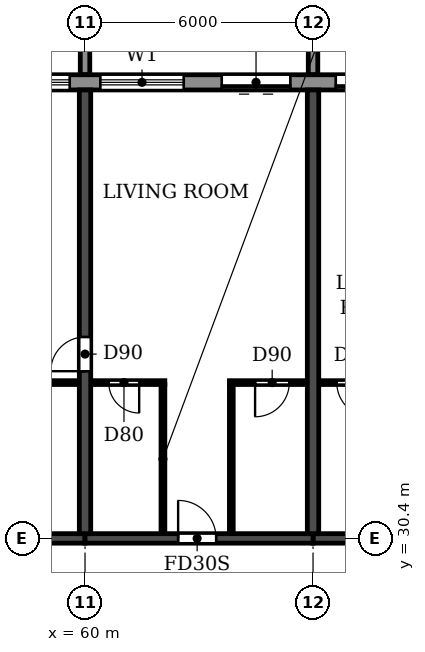
"""IFC4 building model, lengths in metres.
Left out: names, types, materials, properties, quantities, classifications, styles, units other than length and angle.
Written with IfcOpenShell. Run it as: python <this file> out.ifc"""

import sys

from ifc_helpers import new_model, si_unit, direction, frame, frame_2d, origin, place, context, subcontext, project, spatial, polyline, rectangle, outline, extrude, source, transform, mapped, element, fill, save


model = new_model("IFC4")
c1 = context("Model", 3, precision=1e-05, world=origin(), true_north=direction((0.0, 1.0)))
c2 = subcontext(c1, "Body", "Model", "MODEL_VIEW")
j1 = project(units=[si_unit("LENGTHUNIT", "METRE"), si_unit("PLANEANGLEUNIT", "RADIAN")], contexts=[c1])
p1 = place(None, origin())
s1 = spatial("IfcSite", under=j1, at=p1, CompositionType="ELEMENT")
p2 = place(p1, origin())
s2 = spatial("IfcBuilding", under=s1, at=p2, CompositionType="ELEMENT")
p3 = place(p2, frame((0.0, 0.0, 125.7)))
s3 = spatial("IfcBuildingStorey", under=s2, at=p3, CompositionType="ELEMENT", Elevation=125.7)
p4 = place(p3, frame((60.0, 30.525, 0.0), z_axis=(0.0, 0.0, 1.0), x_axis=(0.0, 1.0, 0.0)))
e1 = element("IfcWall", 1, at=p4, inside=s3, PredefinedType="SHEAR", context=c2, shape_type="SweptSolid", body=[
    extrude(rectangle(XDim=11.675, YDim=0.3, at=frame_2d((5.837, 0.0))), origin(), (0.0, 0.0, 1.0), 3.07),
])
p5 = place(p4, frame((4.275, 0.0, 0.0)))
e2 = element("IfcOpeningElement", 2, at=p5, cuts=e1, PredefinedType="OPENING", context=c2, shape_type="SweptSolid", body=[
    extrude(rectangle(XDim=0.9, YDim=2.1, at=frame_2d((0.45, 1.05))), frame((0.0, 0.16, 0.0), z_axis=(0.0, -1.0, 0.0), x_axis=(1.0, 0.0, 0.0)), (0.0, 0.0, 1.0), 0.32),
])
p6 = place(p3, frame((66.0, 30.525, 0.0), z_axis=(0.0, 0.0, 1.0), x_axis=(0.0, 1.0, 0.0)))
e3 = element("IfcWall", 3, at=p6, inside=s3, PredefinedType="SHEAR", context=c2, shape_type="SweptSolid", body=[
    extrude(rectangle(XDim=11.675, YDim=0.3, at=frame_2d((5.837, 0.0))), origin(), (0.0, 0.0, 1.0), 3.07),
])
p7 = place(p3, frame((54.0, 30.4, 0.0), z_axis=(0.0, 0.0, 1.0), x_axis=(1.0, 0.0, 0.0)))
e4 = element("IfcWall", 4, at=p7, inside=s3, PredefinedType="SHEAR", context=c2, shape_type="SweptSolid", body=[
    extrude(rectangle(XDim=6.0, YDim=0.25, at=frame_2d((3.0, 0.0))), origin(), (0.0, 0.0, 1.0), 2.47),
])
p8 = place(p3, frame((60.0, 30.4, 0.0), z_axis=(0.0, 0.0, 1.0), x_axis=(1.0, 0.0, 0.0)))
e5 = element("IfcWall", 5, at=p8, inside=s3, PredefinedType="SHEAR", context=c2, shape_type="SweptSolid", body=[
    extrude(rectangle(XDim=6.0, YDim=0.25, at=frame_2d((3.0, 0.0))), origin(), (0.0, 0.0, 1.0), 2.47),
])
p9 = place(p8, frame((2.45, 0.0, 0.0)))
e6 = element("IfcOpeningElement", 6, at=p9, cuts=e5, PredefinedType="OPENING", context=c2, shape_type="SweptSolid", body=[
    extrude(rectangle(XDim=1.0, YDim=2.1, at=frame_2d((0.5, 1.05))), frame((0.0, 0.135, 0.0), z_axis=(0.0, -1.0, 0.0), x_axis=(1.0, 0.0, 0.0)), (0.0, 0.0, 1.0), 0.27),
])
p10 = place(p3, frame((66.0, 30.4, 0.0), z_axis=(0.0, 0.0, 1.0), x_axis=(1.0, 0.0, 0.0)))
e7 = element("IfcWall", 7, at=p10, inside=s3, PredefinedType="SHEAR", context=c2, shape_type="SweptSolid", body=[
    extrude(rectangle(XDim=6.0, YDim=0.25, at=frame_2d((3.0, 0.0))), origin(), (0.0, 0.0, 1.0), 2.47),
])
p11 = place(p10, frame((2.55, 0.0, 0.0)))
e8 = element("IfcOpeningElement", 8, at=p11, cuts=e7, PredefinedType="OPENING", context=c2, shape_type="SweptSolid", body=[
    extrude(rectangle(XDim=1.0, YDim=2.1, at=frame_2d((0.5, 1.05))), frame((0.0, 0.135, 0.0), z_axis=(0.0, -1.0, 0.0), x_axis=(1.0, 0.0, 0.0)), (0.0, 0.0, 1.0), 0.27),
])
p12 = place(p3, frame((85.317, 42.4, 0.0), z_axis=(0.0, 0.0, 1.0), x_axis=(-1.0, 0.0, 0.0)))
e9 = element("IfcWall", 9, at=p12, inside=s3, PredefinedType="STANDARD", context=c2, shape_type="SweptSolid", body=[
    extrude(rectangle(XDim=68.634, YDim=0.4, at=frame_2d((34.317, 0.0))), origin(), (0.0, 0.0, 1.0), 3.07),
])
p13 = place(p12, frame((64.717, 0.0, 0.9)))
e10 = element("IfcOpeningElement", 10, at=p13, cuts=e9, PredefinedType="OPENING", context=c2, shape_type="SweptSolid", body=[
    extrude(rectangle(XDim=2.2, YDim=1.5, at=frame_2d((1.1, 0.75))), frame((0.0, 0.21, 0.0), z_axis=(0.0, -1.0, 0.0), x_axis=(1.0, 0.0, 0.0)), (0.0, 0.0, 1.0), 0.42),
])
p14 = place(p12, frame((61.917, 0.0, 0.0)))
e11 = element("IfcOpeningElement", 11, at=p14, cuts=e9, PredefinedType="OPENING", context=c2, shape_type="SweptSolid", body=[
    extrude(rectangle(XDim=1.8, YDim=2.4, at=frame_2d((0.9, 1.2))), frame((0.0, 0.21, 0.0), z_axis=(0.0, -1.0, 0.0), x_axis=(1.0, 0.0, 0.0)), (0.0, 0.0, 1.0), 0.42),
])
p15 = place(p12, frame((58.717, 0.0, 0.9)))
e12 = element("IfcOpeningElement", 12, at=p15, cuts=e9, PredefinedType="OPENING", context=c2, shape_type="SweptSolid", body=[
    extrude(rectangle(XDim=2.2, YDim=1.5, at=frame_2d((1.1, 0.75))), frame((0.0, 0.21, 0.0), z_axis=(0.0, -1.0, 0.0), x_axis=(1.0, 0.0, 0.0)), (0.0, 0.0, 1.0), 0.42),
])
p16 = place(p12, frame((55.917, 0.0, 0.0)))
e13 = element("IfcOpeningElement", 13, at=p16, cuts=e9, PredefinedType="OPENING", context=c2, shape_type="SweptSolid", body=[
    extrude(rectangle(XDim=1.8, YDim=2.4, at=frame_2d((0.9, 1.2))), frame((0.0, 0.21, 0.0), z_axis=(0.0, -1.0, 0.0), x_axis=(1.0, 0.0, 0.0)), (0.0, 0.0, 1.0), 0.42),
])
p17 = place(p12, frame((52.717, 0.0, 0.9)))
e14 = element("IfcOpeningElement", 14, at=p17, cuts=e9, PredefinedType="OPENING", context=c2, shape_type="SweptSolid", body=[
    extrude(rectangle(XDim=2.2, YDim=1.5, at=frame_2d((1.1, 0.75))), frame((0.0, 0.21, 0.0), z_axis=(0.0, -1.0, 0.0), x_axis=(1.0, 0.0, 0.0)), (0.0, 0.0, 1.0), 0.42),
])
p18 = place(p12, frame((49.917, 0.0, 0.0)))
e15 = element("IfcOpeningElement", 15, at=p18, cuts=e9, PredefinedType="OPENING", context=c2, shape_type="SweptSolid", body=[
    extrude(rectangle(XDim=1.8, YDim=2.4, at=frame_2d((0.9, 1.2))), frame((0.0, 0.21, 0.0), z_axis=(0.0, -1.0, 0.0), x_axis=(1.0, 0.0, 0.0)), (0.0, 0.0, 1.0), 0.42),
])
p19 = place(p12, frame((46.717, 0.0, 0.9)))
e16 = element("IfcOpeningElement", 16, at=p19, cuts=e9, PredefinedType="OPENING", context=c2, shape_type="SweptSolid", body=[
    extrude(rectangle(XDim=2.2, YDim=1.5, at=frame_2d((1.1, 0.75))), frame((0.0, 0.21, 0.0), z_axis=(0.0, -1.0, 0.0), x_axis=(1.0, 0.0, 0.0)), (0.0, 0.0, 1.0), 0.42),
])
p20 = place(p12, frame((43.917, 0.0, 0.0)))
e17 = element("IfcOpeningElement", 17, at=p20, cuts=e9, PredefinedType="OPENING", context=c2, shape_type="SweptSolid", body=[
    extrude(rectangle(XDim=1.8, YDim=2.4, at=frame_2d((0.9, 1.2))), frame((0.0, 0.21, 0.0), z_axis=(0.0, -1.0, 0.0), x_axis=(1.0, 0.0, 0.0)), (0.0, 0.0, 1.0), 0.42),
])
p21 = place(p12, frame((40.717, 0.0, 0.9)))
e18 = element("IfcOpeningElement", 18, at=p21, cuts=e9, PredefinedType="OPENING", context=c2, shape_type="SweptSolid", body=[
    extrude(rectangle(XDim=2.2, YDim=1.5, at=frame_2d((1.1, 0.75))), frame((0.0, 0.21, 0.0), z_axis=(0.0, -1.0, 0.0), x_axis=(1.0, 0.0, 0.0)), (0.0, 0.0, 1.0), 0.42),
])
p22 = place(p12, frame((37.717, 0.0, 0.9)))
e19 = element("IfcOpeningElement", 19, at=p22, cuts=e9, PredefinedType="OPENING", context=c2, shape_type="SweptSolid", body=[
    extrude(rectangle(XDim=2.2, YDim=1.5, at=frame_2d((1.1, 0.75))), frame((0.0, 0.21, 0.0), z_axis=(0.0, -1.0, 0.0), x_axis=(1.0, 0.0, 0.0)), (0.0, 0.0, 1.0), 0.42),
])
p23 = place(p12, frame((34.917, 0.0, 0.0)))
e20 = element("IfcOpeningElement", 20, at=p23, cuts=e9, PredefinedType="OPENING", context=c2, shape_type="SweptSolid", body=[
    extrude(rectangle(XDim=1.8, YDim=2.4, at=frame_2d((0.9, 1.2))), frame((0.0, 0.21, 0.0), z_axis=(0.0, -1.0, 0.0), x_axis=(1.0, 0.0, 0.0)), (0.0, 0.0, 1.0), 0.42),
])
p24 = place(p12, frame((31.717, 0.0, 0.9)))
e21 = element("IfcOpeningElement", 21, at=p24, cuts=e9, PredefinedType="OPENING", context=c2, shape_type="SweptSolid", body=[
    extrude(rectangle(XDim=2.2, YDim=1.5, at=frame_2d((1.1, 0.75))), frame((0.0, 0.21, 0.0), z_axis=(0.0, -1.0, 0.0), x_axis=(1.0, 0.0, 0.0)), (0.0, 0.0, 1.0), 0.42),
])
p25 = place(p12, frame((28.717, 0.0, 0.9)))
e22 = element("IfcOpeningElement", 22, at=p25, cuts=e9, PredefinedType="OPENING", context=c2, shape_type="SweptSolid", body=[
    extrude(rectangle(XDim=2.2, YDim=1.5, at=frame_2d((1.1, 0.75))), frame((0.0, 0.21, 0.0), z_axis=(0.0, -1.0, 0.0), x_axis=(1.0, 0.0, 0.0)), (0.0, 0.0, 1.0), 0.42),
])
p26 = place(p12, frame((25.717, 0.0, 0.9)))
e23 = element("IfcOpeningElement", 23, at=p26, cuts=e9, PredefinedType="OPENING", context=c2, shape_type="SweptSolid", body=[
    extrude(rectangle(XDim=2.2, YDim=1.5, at=frame_2d((1.1, 0.75))), frame((0.0, 0.21, 0.0), z_axis=(0.0, -1.0, 0.0), x_axis=(1.0, 0.0, 0.0)), (0.0, 0.0, 1.0), 0.42),
])
p27 = place(p12, frame((22.717, 0.0, 0.9)))
e24 = element("IfcOpeningElement", 24, at=p27, cuts=e9, PredefinedType="OPENING", context=c2, shape_type="SweptSolid", body=[
    extrude(rectangle(XDim=2.2, YDim=1.5, at=frame_2d((1.1, 0.75))), frame((0.0, 0.21, 0.0), z_axis=(0.0, -1.0, 0.0), x_axis=(1.0, 0.0, 0.0)), (0.0, 0.0, 1.0), 0.42),
])
p28 = place(p12, frame((19.917, 0.0, 0.0)))
e25 = element("IfcOpeningElement", 25, at=p28, cuts=e9, PredefinedType="OPENING", context=c2, shape_type="SweptSolid", body=[
    extrude(rectangle(XDim=1.8, YDim=2.4, at=frame_2d((0.9, 1.2))), frame((0.0, 0.21, 0.0), z_axis=(0.0, -1.0, 0.0), x_axis=(1.0, 0.0, 0.0)), (0.0, 0.0, 1.0), 0.42),
])
p29 = place(p12, frame((16.917, 0.0, 0.0)))
e26 = element("IfcOpeningElement", 26, at=p29, cuts=e9, PredefinedType="OPENING", context=c2, shape_type="SweptSolid", body=[
    extrude(rectangle(XDim=1.8, YDim=2.4, at=frame_2d((0.9, 1.2))), frame((0.0, 0.21, 0.0), z_axis=(0.0, -1.0, 0.0), x_axis=(1.0, 0.0, 0.0)), (0.0, 0.0, 1.0), 0.42),
])
p30 = place(p12, frame((13.717, 0.0, 0.9)))
e27 = element("IfcOpeningElement", 27, at=p30, cuts=e9, PredefinedType="OPENING", context=c2, shape_type="SweptSolid", body=[
    extrude(rectangle(XDim=2.2, YDim=1.5, at=frame_2d((1.1, 0.75))), frame((0.0, 0.21, 0.0), z_axis=(0.0, -1.0, 0.0), x_axis=(1.0, 0.0, 0.0)), (0.0, 0.0, 1.0), 0.42),
])
p31 = place(p12, frame((10.717, 0.0, 0.9)))
e28 = element("IfcOpeningElement", 28, at=p31, cuts=e9, PredefinedType="OPENING", context=c2, shape_type="SweptSolid", body=[
    extrude(rectangle(XDim=2.2, YDim=1.5, at=frame_2d((1.1, 0.75))), frame((0.0, 0.21, 0.0), z_axis=(0.0, -1.0, 0.0), x_axis=(1.0, 0.0, 0.0)), (0.0, 0.0, 1.0), 0.42),
])
p32 = place(p12, frame((7.717, 0.0, 0.9)))
e29 = element("IfcOpeningElement", 29, at=p32, cuts=e9, PredefinedType="OPENING", context=c2, shape_type="SweptSolid", body=[
    extrude(rectangle(XDim=2.2, YDim=1.5, at=frame_2d((1.1, 0.75))), frame((0.0, 0.21, 0.0), z_axis=(0.0, -1.0, 0.0), x_axis=(1.0, 0.0, 0.0)), (0.0, 0.0, 1.0), 0.42),
])
p33 = place(p12, frame((4.917, 0.0, 0.0)))
e30 = element("IfcOpeningElement", 30, at=p33, cuts=e9, PredefinedType="OPENING", context=c2, shape_type="SweptSolid", body=[
    extrude(rectangle(XDim=1.8, YDim=2.4, at=frame_2d((0.9, 1.2))), frame((0.0, 0.21, 0.0), z_axis=(0.0, -1.0, 0.0), x_axis=(1.0, 0.0, 0.0)), (0.0, 0.0, 1.0), 0.42),
])
p34 = place(p12, frame((1.717, 0.0, 0.9)))
e31 = element("IfcOpeningElement", 31, at=p34, cuts=e9, PredefinedType="OPENING", context=c2, shape_type="SweptSolid", body=[
    extrude(rectangle(XDim=2.2, YDim=1.5, at=frame_2d((1.1, 0.75))), frame((0.0, 0.21, 0.0), z_axis=(0.0, -1.0, 0.0), x_axis=(1.0, 0.0, 0.0)), (0.0, 0.0, 1.0), 0.42),
])
m1 = source(origin(), c2, "Body", "SweptSolid", [
    extrude(outline(polyline([(0.0, 0.0), (0.25, 0.0), (0.25, 3.1), (0.0, 3.1), (0.0, 0.0)])), origin(), (0.0, 0.0, 1.0), 3.1),
])
for number, where in (
    (32, (59.875, 42.6, 0.0)),
    (33, (65.875, 42.6, 0.0)),
):
    element("IfcWall", number, at=place(p3, frame(where)), inside=s3, PredefinedType="STANDARD", context=c2, shape_type="MappedRepresentation", body=[
        mapped(m1, transform((0.0, 0.0, 0.0))),
    ])
p35 = place(p3, frame((57.1, 34.5, 0.0), z_axis=(0.0, 0.0, 1.0), x_axis=(1.0, 0.0, 0.0)))
e34 = element("IfcWall", 34, at=p35, inside=s3, PredefinedType="PARTITIONING", context=c2, shape_type="SweptSolid", body=[
    extrude(rectangle(XDim=2.74, YDim=0.1, at=frame_2d((1.37, 0.0))), origin(), (0.0, 0.0, 1.0), 3.07),
])
p36 = place(p35, frame((1.0, 0.0, 0.0)))
e35 = element("IfcOpeningElement", 35, at=p36, cuts=e34, PredefinedType="OPENING", context=c2, shape_type="SweptSolid", body=[
    extrude(rectangle(XDim=0.8, YDim=2.1, at=frame_2d((0.4, 1.05))), frame((0.0, 0.06, 0.0), z_axis=(0.0, -1.0, 0.0), x_axis=(1.0, 0.0, 0.0)), (0.0, 0.0, 1.0), 0.12),
])
p37 = place(p3, frame((60.16, 34.5, 0.0), z_axis=(0.0, 0.0, 1.0), x_axis=(1.0, 0.0, 0.0)))
e36 = element("IfcWall", 36, at=p37, inside=s3, PredefinedType="PARTITIONING", context=c2, shape_type="SweptSolid", body=[
    extrude(rectangle(XDim=1.94, YDim=0.1, at=frame_2d((0.97, 0.0))), origin(), (0.0, 0.0, 1.0), 3.07),
])
p38 = place(p37, frame((0.465, 0.0, 0.0)))
e37 = element("IfcOpeningElement", 37, at=p38, cuts=e36, PredefinedType="OPENING", context=c2, shape_type="SweptSolid", body=[
    extrude(rectangle(XDim=0.8, YDim=2.1, at=frame_2d((0.4, 1.05))), frame((0.0, 0.06, 0.0), z_axis=(0.0, -1.0, 0.0), x_axis=(1.0, 0.0, 0.0)), (0.0, 0.0, 1.0), 0.12),
])
p39 = place(p3, frame((63.8, 34.5, 0.0), z_axis=(0.0, 0.0, 1.0), x_axis=(1.0, 0.0, 0.0)))
e38 = element("IfcWall", 38, at=p39, inside=s3, PredefinedType="PARTITIONING", context=c2, shape_type="SweptSolid", body=[
    extrude(rectangle(XDim=2.04, YDim=0.1, at=frame_2d((1.02, 0.0))), origin(), (0.0, 0.0, 1.0), 3.07),
])
p40 = place(p39, frame((0.675, 0.0, 0.0)))
e39 = element("IfcOpeningElement", 39, at=p40, cuts=e38, PredefinedType="OPENING", context=c2, shape_type="SweptSolid", body=[
    extrude(rectangle(XDim=0.9, YDim=2.1, at=frame_2d((0.45, 1.05))), frame((0.0, 0.06, 0.0), z_axis=(0.0, -1.0, 0.0), x_axis=(1.0, 0.0, 0.0)), (0.0, 0.0, 1.0), 0.12),
])
p41 = place(p3, frame((66.16, 34.5, 0.0), z_axis=(0.0, 0.0, 1.0), x_axis=(1.0, 0.0, 0.0)))
e40 = element("IfcWall", 40, at=p41, inside=s3, PredefinedType="PARTITIONING", context=c2, shape_type="SweptSolid", body=[
    extrude(rectangle(XDim=2.04, YDim=0.1, at=frame_2d((1.02, 0.0))), origin(), (0.0, 0.0, 1.0), 3.07),
])
p42 = place(p41, frame((0.465, 0.0, 0.0)))
e41 = element("IfcOpeningElement", 41, at=p42, cuts=e40, PredefinedType="OPENING", context=c2, shape_type="SweptSolid", body=[
    extrude(rectangle(XDim=0.9, YDim=2.1, at=frame_2d((0.45, 1.05))), frame((0.0, 0.06, 0.0), z_axis=(0.0, -1.0, 0.0), x_axis=(1.0, 0.0, 0.0)), (0.0, 0.0, 1.0), 0.12),
])
for number, where, z_axis, x_axis in (
    (42, (62.05, 30.535, 0.0), (0.0, 0.0, 1.0), (0.0, 1.0, 0.0)),
    (43, (63.85, 30.535, 0.0), (0.0, 0.0, 1.0), (0.0, 1.0, 0.0)),
):
    element("IfcWall", number, at=place(p3, frame(where, z_axis=z_axis, x_axis=x_axis)), inside=s3, PredefinedType="PARTITIONING", context=c2, shape_type="SweptSolid", body=[
        extrude(rectangle(XDim=3.915, YDim=0.1, at=frame_2d((1.958, 0.0))), origin(), (0.0, 0.0, 1.0), 3.07),
    ])
p43 = place(p26, origin())
e44 = element("IfcWindow", 44, at=p43, inside=s3, PartitioningType="DOUBLE_PANEL_HORIZONTAL", PredefinedType="WINDOW", context=c2, shape_type="SweptSolid", body=[
    extrude(rectangle(XDim=2.2, YDim=1.5, at=frame_2d((1.1, 0.75))), frame((0.0, 0.03, 0.0), z_axis=(0.0, -1.0, 0.0), x_axis=(1.0, 0.0, 0.0)), (0.0, 0.0, 1.0), 0.06),
])
fill(e23, e44)
p44 = place(p27, origin())
e45 = element("IfcWindow", 45, at=p44, inside=s3, PartitioningType="DOUBLE_PANEL_HORIZONTAL", PredefinedType="WINDOW", context=c2, shape_type="SweptSolid", body=[
    extrude(rectangle(XDim=2.2, YDim=1.5, at=frame_2d((1.1, 0.75))), frame((0.0, 0.03, 0.0), z_axis=(0.0, -1.0, 0.0), x_axis=(1.0, 0.0, 0.0)), (0.0, 0.0, 1.0), 0.06),
])
fill(e24, e45)
p45 = place(p28, origin())
e46 = element("IfcDoor", 46, at=p45, inside=s3, OperationType="DOUBLE_DOOR_SLIDING", PredefinedType="DOOR", context=c2, shape_type="SweptSolid", body=[
    extrude(rectangle(XDim=1.8, YDim=2.4, at=frame_2d((0.9, 1.2))), frame((0.0, 0.025, 0.0), z_axis=(0.0, -1.0, 0.0), x_axis=(1.0, 0.0, 0.0)), (0.0, 0.0, 1.0), 0.05),
])
fill(e25, e46)
p46 = place(p29, origin())
e47 = element("IfcDoor", 47, at=p46, inside=s3, OperationType="DOUBLE_DOOR_SLIDING", PredefinedType="DOOR", context=c2, shape_type="SweptSolid", body=[
    extrude(rectangle(XDim=1.8, YDim=2.4, at=frame_2d((0.9, 1.2))), frame((0.0, 0.025, 0.0), z_axis=(0.0, -1.0, 0.0), x_axis=(1.0, 0.0, 0.0)), (0.0, 0.0, 1.0), 0.05),
])
fill(e26, e47)
p47 = place(p5, origin())
e48 = element("IfcDoor", 48, at=p47, inside=s3, OperationType="SINGLE_SWING_LEFT", PredefinedType="DOOR", context=c2, shape_type="SweptSolid", body=[
    extrude(rectangle(XDim=0.9, YDim=2.1, at=frame_2d((0.45, 1.05))), frame((0.0, 0.025, 0.0), z_axis=(0.0, -1.0, 0.0), x_axis=(1.0, 0.0, 0.0)), (0.0, 0.0, 1.0), 0.05),
])
fill(e2, e48)
p48 = place(p38, frame((0.8, 0.0, 0.0), z_axis=(0.0, 0.0, 1.0), x_axis=(-1.0, 0.0, 0.0)))
e49 = element("IfcDoor", 49, at=p48, inside=s3, OperationType="SINGLE_SWING_LEFT", PredefinedType="DOOR", context=c2, shape_type="SweptSolid", body=[
    extrude(rectangle(XDim=0.8, YDim=2.1, at=frame_2d((0.4, 1.05))), frame((0.0, 0.025, 0.0), z_axis=(0.0, -1.0, 0.0), x_axis=(1.0, 0.0, 0.0)), (0.0, 0.0, 1.0), 0.05),
])
fill(e37, e49)
p49 = place(p9, origin())
e50 = element("IfcDoor", 50, at=p49, inside=s3, OperationType="SINGLE_SWING_LEFT", PredefinedType="DOOR", context=c2, shape_type="SweptSolid", body=[
    extrude(rectangle(XDim=1.0, YDim=2.1, at=frame_2d((0.5, 1.05))), frame((0.0, 0.025, 0.0), z_axis=(0.0, -1.0, 0.0), x_axis=(1.0, 0.0, 0.0)), (0.0, 0.0, 1.0), 0.05),
])
fill(e6, e50)
p50 = place(p40, frame((0.9, 0.0, 0.0), z_axis=(0.0, 0.0, 1.0), x_axis=(-1.0, 0.0, 0.0)))
e51 = element("IfcDoor", 51, at=p50, inside=s3, OperationType="SINGLE_SWING_RIGHT", PredefinedType="DOOR", context=c2, shape_type="SweptSolid", body=[
    extrude(rectangle(XDim=0.9, YDim=2.1, at=frame_2d((0.45, 1.05))), frame((0.0, 0.025, 0.0), z_axis=(0.0, -1.0, 0.0), x_axis=(1.0, 0.0, 0.0)), (0.0, 0.0, 1.0), 0.05),
])
fill(e39, e51)
p51 = place(p42, frame((0.9, 0.0, 0.0), z_axis=(0.0, 0.0, 1.0), x_axis=(-1.0, 0.0, 0.0)))
e52 = element("IfcDoor", 52, at=p51, inside=s3, OperationType="SINGLE_SWING_LEFT", PredefinedType="DOOR", context=c2, shape_type="SweptSolid", body=[
    extrude(rectangle(XDim=0.9, YDim=2.1, at=frame_2d((0.45, 1.05))), frame((0.0, 0.025, 0.0), z_axis=(0.0, -1.0, 0.0), x_axis=(1.0, 0.0, 0.0)), (0.0, 0.0, 1.0), 0.05),
])
fill(e41, e52)
save(model, sys.argv[1])
